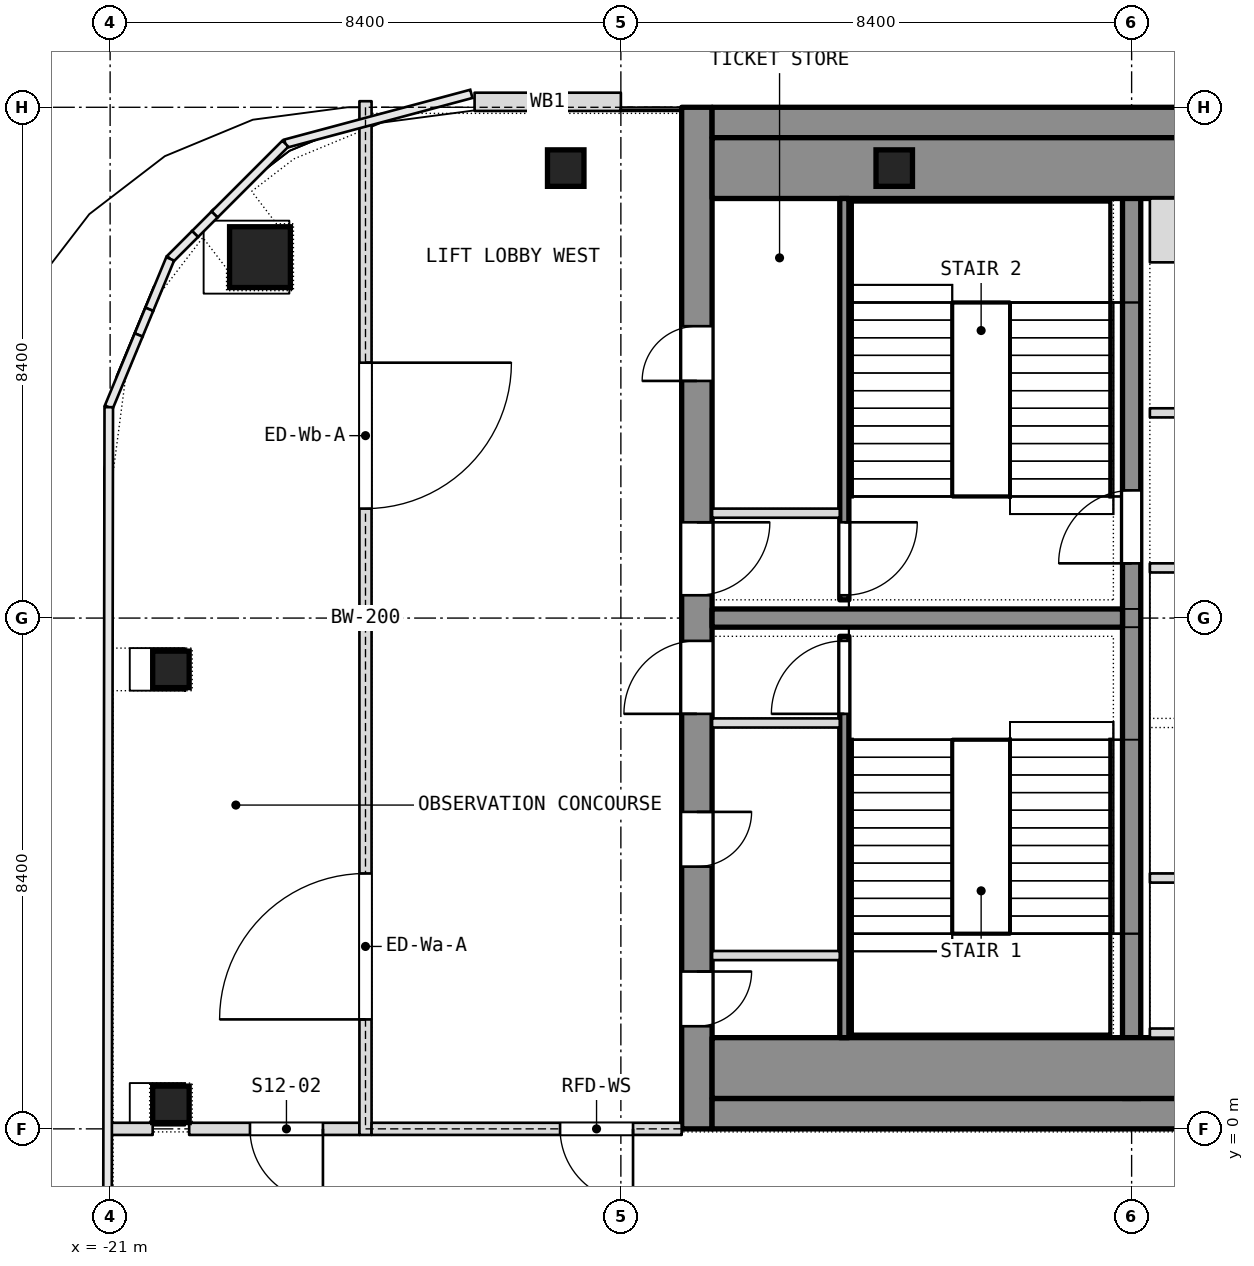
"""IFC4 building model, lengths in metres.
Left out: names, types, materials, properties, quantities, classifications, styles, units other than length and angle.
Written with IfcOpenShell. Run it as: python <this file> out.ifc"""

import sys

from ifc_helpers import new_model, si_unit, direction, frame, frame_2d, origin, origin_2d, place, context, subcontext, project, spatial, rectangle, extrude, element, fill, save


model = new_model("IFC4")
c1 = context("Model", 3, precision=1e-05, world=origin(), true_north=direction((0.0, 1.0)))
c2 = subcontext(c1, "Body", "Model", "MODEL_VIEW")
j1 = project(units=[si_unit("LENGTHUNIT", "METRE"), si_unit("PLANEANGLEUNIT", "RADIAN")], contexts=[c1])
p1 = place(None, origin())
s1 = spatial("IfcSite", under=j1, at=p1, CompositionType="ELEMENT")
p2 = place(p1, origin())
s2 = spatial("IfcBuilding", under=s1, at=p2, CompositionType="ELEMENT")
p3 = place(p2, frame((0.0, 0.0, 281.3)))
s3 = spatial("IfcBuildingStorey", under=s2, at=p3, CompositionType="ELEMENT", Elevation=281.3)
p4 = place(p3, frame((-11.35, 0.0, 0.0), z_axis=(0.0, 0.0, 1.0), x_axis=(0.0, 1.0, 0.0)))
e1 = element("IfcWall", 1, at=p4, inside=s3, PredefinedType="SHEAR", context=c2, shape_type="SweptSolid", body=[
    extrude(rectangle(XDim=16.8, YDim=0.5, at=frame_2d((8.4, 0.0))), origin(), (0.0, 0.0, 1.0), 7.2),
])
p5 = place(p4, frame((1.688, 0.0, 0.0)))
e2 = element("IfcOpeningElement", 2, at=p5, cuts=e1, PredefinedType="OPENING", context=c2, shape_type="SweptSolid", body=[
    extrude(rectangle(XDim=0.9, YDim=2.1, at=frame_2d((0.45, 1.05))), frame((0.0, 0.25, 0.0), z_axis=(0.0, -1.0, 0.0), x_axis=(1.0, 0.0, 0.0)), (0.0, 0.0, 1.0), 0.5),
])
p6 = place(p4, frame((4.312, 0.0, 0.0)))
e3 = element("IfcOpeningElement", 3, at=p6, cuts=e1, PredefinedType="OPENING", context=c2, shape_type="SweptSolid", body=[
    extrude(rectangle(XDim=0.9, YDim=2.1, at=frame_2d((0.45, 1.05))), frame((0.0, 0.25, 0.0), z_axis=(0.0, -1.0, 0.0), x_axis=(1.0, 0.0, 0.0)), (0.0, 0.0, 1.0), 0.5),
])
p7 = place(p4, frame((6.825, 0.0, 0.0)))
e4 = element("IfcOpeningElement", 4, at=p7, cuts=e1, PredefinedType="OPENING", context=c2, shape_type="SweptSolid", body=[
    extrude(rectangle(XDim=1.2, YDim=2.1, at=frame_2d((0.6, 1.05))), frame((0.0, 0.25, 0.0), z_axis=(0.0, -1.0, 0.0), x_axis=(1.0, 0.0, 0.0)), (0.0, 0.0, 1.0), 0.5),
])
p8 = place(p4, frame((12.3, 0.0, 0.0)))
e5 = element("IfcOpeningElement", 5, at=p8, cuts=e1, PredefinedType="OPENING", context=c2, shape_type="SweptSolid", body=[
    extrude(rectangle(XDim=0.9, YDim=2.1, at=frame_2d((0.45, 1.05))), frame((0.0, 0.25, 0.0), z_axis=(0.0, -1.0, 0.0), x_axis=(1.0, 0.0, 0.0)), (0.0, 0.0, 1.0), 0.5),
])
p9 = place(p4, frame((8.775, 0.0, 0.0)))
e6 = element("IfcOpeningElement", 6, at=p9, cuts=e1, PredefinedType="OPENING", context=c2, shape_type="SweptSolid", body=[
    extrude(rectangle(XDim=1.2, YDim=2.1, at=frame_2d((0.6, 1.05))), frame((0.0, 0.25, 0.0), z_axis=(0.0, -1.0, 0.0), x_axis=(1.0, 0.0, 0.0)), (0.0, 0.0, 1.0), 0.5),
])
p10 = place(p3, frame((-11.1, 0.25, 0.0), z_axis=(0.0, 0.0, 1.0), x_axis=(1.0, 0.0, 0.0)))
e7 = element("IfcWall", 7, at=p10, inside=s3, PredefinedType="SHEAR", context=c2, shape_type="SweptSolid", body=[
    extrude(rectangle(XDim=22.2, YDim=0.5, at=frame_2d((11.1, 0.0))), origin(), (0.0, 0.0, 1.0), 7.2),
])
p11 = place(p10, frame((10.85, 0.0, 0.0)))
e8 = element("IfcOpeningElement", 8, at=p11, cuts=e7, PredefinedType="OPENING", context=c2, shape_type="SweptSolid", body=[
    extrude(rectangle(XDim=1.4, YDim=2.1, at=frame_2d((0.7, 1.05))), frame((0.0, 0.25, 0.0), z_axis=(0.0, -1.0, 0.0), x_axis=(1.0, 0.0, 0.0)), (0.0, 0.0, 1.0), 0.5),
])
p12 = place(p3, frame((-11.1, 16.55, 0.0), z_axis=(0.0, 0.0, 1.0), x_axis=(1.0, 0.0, 0.0)))
e9 = element("IfcWall", 9, at=p12, inside=s3, PredefinedType="SHEAR", context=c2, shape_type="SweptSolid", body=[
    extrude(rectangle(XDim=22.2, YDim=0.5, at=frame_2d((11.1, 0.0))), origin(), (0.0, 0.0, 1.0), 7.2),
])
p13 = place(p3, frame((-4.2, 0.5, 0.0), z_axis=(0.0, 0.0, 1.0), x_axis=(0.0, 1.0, 0.0)))
e10 = element("IfcWall", 10, at=p13, inside=s3, PredefinedType="SHEAR", context=c2, shape_type="SweptSolid", body=[
    extrude(rectangle(XDim=15.8, YDim=0.3, at=frame_2d((7.9, 0.0))), origin(), (0.0, 0.0, 1.0), 7.2),
])
p14 = place(p13, frame((8.8, 0.0, 0.0)))
e11 = element("IfcOpeningElement", 11, at=p14, cuts=e10, PredefinedType="OPENING", context=c2, shape_type="SweptSolid", body=[
    extrude(rectangle(XDim=1.2, YDim=2.1, at=frame_2d((0.6, 1.05))), frame((0.0, 0.15, 0.0), z_axis=(0.0, -1.0, 0.0), x_axis=(1.0, 0.0, 0.0)), (0.0, 0.0, 1.0), 0.3),
])
p15 = place(p3, frame((-11.1, 8.4, 0.0), z_axis=(0.0, 0.0, 1.0), x_axis=(1.0, 0.0, 0.0)))
e12 = element("IfcWall", 12, at=p15, inside=s3, PredefinedType="SHEAR", context=c2, shape_type="SweptSolid", body=[
    extrude(rectangle(XDim=6.75, YDim=0.3, at=frame_2d((3.375, 0.0))), origin(), (0.0, 0.0, 1.0), 7.2),
])
p16 = place(p3, frame((-18.535, 14.335, 0.0), z_axis=(0.0, 0.0, 1.0), x_axis=(1.0, 0.0, 0.0)))
e13 = element("IfcColumn", 13, at=p16, inside=s3, PredefinedType="COLUMN", context=c2, shape_type="SweptSolid", body=[
    extrude(rectangle(XDim=1.0, YDim=1.0, at=origin_2d()), origin(), (0.0, 0.0, 1.0), 7.2),
])
for number, where, z_axis, x_axis in (
    (14, (-20.0, 0.403, 0.0), (0.0, 0.0, 1.0), (1.0, 0.0, 0.0)),
    (15, (-20.0, 7.556, 0.0), (0.0, 0.0, 1.0), (1.0, 0.0, 0.0)),
    (16, (-13.507, 15.8, 0.0), (0.0, 0.0, 1.0), (1.0, 0.0, 0.0)),
    (17, (-8.104, 15.8, 0.0), (0.0, 0.0, 1.0), (1.0, 0.0, 0.0)),
):
    element("IfcColumn", number, at=place(p3, frame(where, z_axis=z_axis, x_axis=x_axis)), inside=s3, PredefinedType="COLUMN", context=c2, shape_type="SweptSolid", body=[
        extrude(rectangle(XDim=0.6, YDim=0.6, at=origin_2d()), origin(), (0.0, 0.0, 1.0), 7.2),
    ])
p17 = place(p3, frame((-21.0, 0.0, 0.0), z_axis=(0.0, 0.0, 1.0), x_axis=(1.0, 0.0, 0.0)))
e18 = element("IfcWall", 18, at=p17, inside=s3, PredefinedType="PARTITIONING", context=c2, shape_type="SweptSolid", body=[
    extrude(rectangle(XDim=0.7, YDim=0.2, at=frame_2d((0.35, 0.0))), origin(), (0.0, 0.0, 1.0), 6.94),
])
p18 = place(p3, frame((-19.7, 0.0, 0.0), z_axis=(0.0, 0.0, 1.0), x_axis=(1.0, 0.0, 0.0)))
e19 = element("IfcWall", 19, at=p18, inside=s3, PredefinedType="PARTITIONING", context=c2, shape_type="SweptSolid", body=[
    extrude(rectangle(XDim=2.8, YDim=0.2, at=frame_2d((1.4, 0.0))), origin(), (0.0, 0.0, 1.0), 6.6),
])
p19 = place(p18, frame((1.0, 0.0, 0.0)))
e20 = element("IfcOpeningElement", 20, at=p19, cuts=e19, PredefinedType="OPENING", context=c2, shape_type="SweptSolid", body=[
    extrude(rectangle(XDim=1.2, YDim=2.1, at=frame_2d((0.6, 1.05))), frame((0.0, 0.1, 0.0), z_axis=(0.0, -1.0, 0.0), x_axis=(1.0, 0.0, 0.0)), (0.0, 0.0, 1.0), 0.2),
])
p20 = place(p3, frame((-12.6, 16.89, 0.0), z_axis=(0.0, 0.0, 1.0), x_axis=(-1.0, 0.0, 0.0)))
e21 = element("IfcWall", 21, at=p20, inside=s3, PredefinedType="NOTDEFINED", context=c2, shape_type="SweptSolid", body=[
    extrude(rectangle(XDim=2.406, YDim=0.3, at=frame_2d((1.203, 0.0))), origin(), (0.0, 0.0, 1.0), 7.2),
])
p21 = place(p3, frame((-11.1, 1.0, 0.0), z_axis=(0.0, 0.0, 1.0), x_axis=(1.0, 0.0, 0.0)))
e22 = element("IfcWall", 22, at=p21, inside=s3, PredefinedType="PARTITIONING", context=c2, shape_type="SweptSolid", body=[
    extrude(rectangle(XDim=10.85, YDim=1.0, at=frame_2d((5.425, 0.0))), origin(), (0.0, 0.0, 1.0), 6.94),
])
p22 = place(p3, frame((-11.1, 15.8, 0.0), z_axis=(0.0, 0.0, 1.0), x_axis=(1.0, 0.0, 0.0)))
e23 = element("IfcWall", 23, at=p22, inside=s3, PredefinedType="PARTITIONING", context=c2, shape_type="SweptSolid", body=[
    extrude(rectangle(XDim=22.2, YDim=1.0, at=frame_2d((11.1, 0.0))), origin(), (0.0, 0.0, 1.0), 6.94),
])
p23 = place(p3, frame((-8.925, 1.5, 0.0), z_axis=(0.0, 0.0, 1.0), x_axis=(0.0, 1.0, 0.0)))
e24 = element("IfcWall", 24, at=p23, inside=s3, PredefinedType="SHEAR", context=c2, shape_type="SweptSolid", body=[
    extrude(rectangle(XDim=6.6, YDim=0.15, at=frame_2d((3.3, 0.0))), origin(), (0.0, 0.0, 1.0), 6.94),
])
p24 = place(p23, frame((5.325, 0.0, 0.0)))
e25 = element("IfcOpeningElement", 25, at=p24, cuts=e24, PredefinedType="OPENING", context=c2, shape_type="SweptSolid", body=[
    extrude(rectangle(XDim=1.2, YDim=2.1, at=frame_2d((0.6, 1.05))), frame((0.0, 0.075, 0.0), z_axis=(0.0, -1.0, 0.0), x_axis=(1.0, 0.0, 0.0)), (0.0, 0.0, 1.0), 0.15),
])
for number, where, z_axis, x_axis in (
    (26, (-11.1, 6.675, 0.0), (0.0, 0.0, 1.0), (1.0, 0.0, 0.0)),
    (27, (-11.1, 2.85, 0.0), (0.0, 0.0, 1.0), (1.0, 0.0, 0.0)),
):
    element("IfcWall", number, at=place(p3, frame(where, z_axis=z_axis, x_axis=x_axis)), inside=s3, PredefinedType="PARTITIONING", context=c2, shape_type="SweptSolid", body=[
        extrude(rectangle(XDim=2.1, YDim=0.15, at=frame_2d((1.05, 0.0))), origin(), (0.0, 0.0, 1.0), 6.94),
    ])
p25 = place(p3, frame((-8.925, 8.7, 0.0), z_axis=(0.0, 0.0, 1.0), x_axis=(0.0, 1.0, 0.0)))
e28 = element("IfcWall", 28, at=p25, inside=s3, PredefinedType="SHEAR", context=c2, shape_type="SweptSolid", body=[
    extrude(rectangle(XDim=6.6, YDim=0.15, at=frame_2d((3.3, 0.0))), origin(), (0.0, 0.0, 1.0), 6.94),
])
p26 = place(p25, frame((0.075, 0.0, 0.0)))
e29 = element("IfcOpeningElement", 29, at=p26, cuts=e28, PredefinedType="OPENING", context=c2, shape_type="SweptSolid", body=[
    extrude(rectangle(XDim=1.2, YDim=2.1, at=frame_2d((0.6, 1.05))), frame((0.0, 0.075, 0.0), z_axis=(0.0, -1.0, 0.0), x_axis=(1.0, 0.0, 0.0)), (0.0, 0.0, 1.0), 0.15),
])
p27 = place(p3, frame((-11.1, 10.125, 0.0), z_axis=(0.0, 0.0, 1.0), x_axis=(1.0, 0.0, 0.0)))
e30 = element("IfcWall", 30, at=p27, inside=s3, PredefinedType="PARTITIONING", context=c2, shape_type="SweptSolid", body=[
    extrude(rectangle(XDim=2.1, YDim=0.15, at=frame_2d((1.05, 0.0))), origin(), (0.0, 0.0, 1.0), 6.94),
])
p28 = place(p3, frame((-3.9, 4.125, 0.0), z_axis=(0.0, 0.0, 1.0), x_axis=(1.0, 0.0, 0.0)))
e31 = element("IfcWall", 31, at=p28, inside=s3, PredefinedType="PARTITIONING", context=c2, shape_type="SweptSolid", body=[
    extrude(rectangle(XDim=7.8, YDim=0.15, at=frame_2d((3.9, 0.0))), origin(), (0.0, 0.0, 1.0), 6.94),
])
p29 = place(p28, frame((3.75, 0.0, 0.0)))
e32 = element("IfcOpeningElement", 32, at=p29, cuts=e31, PredefinedType="OPENING", context=c2, shape_type="SweptSolid", body=[
    extrude(rectangle(XDim=1.2, YDim=2.1, at=frame_2d((0.6, 1.05))), frame((0.0, 0.075, 0.0), z_axis=(0.0, -1.0, 0.0), x_axis=(1.0, 0.0, 0.0)), (0.0, 0.0, 1.0), 0.15),
])
p30 = place(p3, frame((-3.9, 11.775, 0.0), z_axis=(0.0, 0.0, 1.0), x_axis=(1.0, 0.0, 0.0)))
e33 = element("IfcWall", 33, at=p30, inside=s3, PredefinedType="PARTITIONING", context=c2, shape_type="SweptSolid", body=[
    extrude(rectangle(XDim=7.8, YDim=0.15, at=frame_2d((3.9, 0.0))), origin(), (0.0, 0.0, 1.0), 6.94),
])
p31 = place(p30, frame((3.3, 0.0, 0.0)))
e34 = element("IfcOpeningElement", 34, at=p31, cuts=e33, PredefinedType="OPENING", context=c2, shape_type="SweptSolid", body=[
    extrude(rectangle(XDim=1.2, YDim=2.1, at=frame_2d((0.6, 1.05))), frame((0.0, 0.075, 0.0), z_axis=(0.0, -1.0, 0.0), x_axis=(1.0, 0.0, 0.0)), (0.0, 0.0, 1.0), 0.15),
])
p32 = place(p3, frame((-3.9, 1.575, 0.0), z_axis=(0.0, 0.0, 1.0), x_axis=(1.0, 0.0, 0.0)))
e35 = element("IfcWall", 35, at=p32, inside=s3, PredefinedType="SHEAR", context=c2, shape_type="SweptSolid", body=[
    extrude(rectangle(XDim=3.0, YDim=0.15, at=frame_2d((1.5, 0.0))), origin(), (0.0, 0.0, 1.0), 7.2),
])
p33 = place(p3, frame((-3.9, 9.225, 0.0), z_axis=(0.0, 0.0, 1.0), x_axis=(1.0, 0.0, 0.0)))
e36 = element("IfcWall", 36, at=p33, inside=s3, PredefinedType="SHEAR", context=c2, shape_type="SweptSolid", body=[
    extrude(rectangle(XDim=2.25, YDim=0.15, at=frame_2d((1.125, 0.0))), origin(), (0.0, 0.0, 1.0), 7.2),
])
p34 = place(p3, frame((-3.9, 14.775, 0.0), z_axis=(0.0, 0.0, 1.0), x_axis=(1.0, 0.0, 0.0)))
e37 = element("IfcWall", 37, at=p34, inside=s3, PredefinedType="PARTITIONING", context=c2, shape_type="SweptSolid", body=[
    extrude(rectangle(XDim=2.25, YDim=1.05, at=frame_2d((1.125, 0.0))), origin(), (0.0, 0.0, 1.0), 6.94),
])
p35 = place(p3, frame((-16.8, -0.1, 0.0), z_axis=(0.0, 0.0, 1.0), x_axis=(0.0, 1.0, 0.0)))
e38 = element("IfcWall", 38, at=p35, inside=s3, PredefinedType="PARTITIONING", context=c2, shape_type="SweptSolid", body=[
    extrude(rectangle(XDim=17.0, YDim=0.2, at=frame_2d((8.5, 0.0))), origin(), (0.0, 0.0, 1.0), 6.94),
])
p36 = place(p35, frame((1.9, 0.0, 0.0)))
e39 = element("IfcOpeningElement", 39, at=p36, cuts=e38, PredefinedType="OPENING", context=c2, shape_type="SweptSolid", body=[
    extrude(rectangle(XDim=2.4, YDim=2.1, at=frame_2d((1.2, 1.05))), frame((0.0, 0.1, 0.0), z_axis=(0.0, -1.0, 0.0), x_axis=(1.0, 0.0, 0.0)), (0.0, 0.0, 1.0), 0.2),
])
p37 = place(p35, frame((10.3, 0.0, 0.0)))
e40 = element("IfcOpeningElement", 40, at=p37, cuts=e38, PredefinedType="OPENING", context=c2, shape_type="SweptSolid", body=[
    extrude(rectangle(XDim=2.4, YDim=2.1, at=frame_2d((1.2, 1.05))), frame((0.0, 0.1, 0.0), z_axis=(0.0, -1.0, 0.0), x_axis=(1.0, 0.0, 0.0)), (0.0, 0.0, 1.0), 0.2),
])
p38 = place(p3, frame((-16.7, 0.0, 0.0), z_axis=(0.0, 0.0, 1.0), x_axis=(1.0, 0.0, 0.0)))
e41 = element("IfcWall", 41, at=p38, inside=s3, PredefinedType="PARTITIONING", context=c2, shape_type="SweptSolid", body=[
    extrude(rectangle(XDim=5.1, YDim=0.2, at=frame_2d((2.55, 0.0))), origin(), (0.0, 0.0, 1.0), 6.6),
])
p39 = place(p38, frame((3.1, 0.0, 0.0)))
e42 = element("IfcOpeningElement", 42, at=p39, cuts=e41, PredefinedType="OPENING", context=c2, shape_type="SweptSolid", body=[
    extrude(rectangle(XDim=1.2, YDim=2.1, at=frame_2d((0.6, 1.05))), frame((0.0, 0.1, 0.0), z_axis=(0.0, -1.0, 0.0), x_axis=(1.0, 0.0, 0.0)), (0.0, 0.0, 1.0), 0.2),
])
p40 = place(p19, origin())
e43 = element("IfcDoor", 43, at=p40, inside=s3, OperationType="SINGLE_SWING_LEFT", PredefinedType="DOOR", context=c2, shape_type="SweptSolid", body=[
    extrude(rectangle(XDim=1.2, YDim=2.1, at=frame_2d((0.6, 1.05))), frame((0.0, 0.025, 0.0), z_axis=(0.0, -1.0, 0.0), x_axis=(1.0, 0.0, 0.0)), (0.0, 0.0, 1.0), 0.05),
])
fill(e20, e43)
p41 = place(p5, origin())
e44 = element("IfcDoor", 44, at=p41, inside=s3, OperationType="SINGLE_SWING_LEFT", PredefinedType="DOOR", context=c2, shape_type="SweptSolid", body=[
    extrude(rectangle(XDim=0.9, YDim=2.1, at=frame_2d((0.45, 1.05))), frame((0.0, 0.025, 0.0), z_axis=(0.0, -1.0, 0.0), x_axis=(1.0, 0.0, 0.0)), (0.0, 0.0, 1.0), 0.05),
])
fill(e2, e44)
p42 = place(p6, origin())
e45 = element("IfcDoor", 45, at=p42, inside=s3, OperationType="SINGLE_SWING_LEFT", PredefinedType="DOOR", context=c2, shape_type="SweptSolid", body=[
    extrude(rectangle(XDim=0.9, YDim=2.1, at=frame_2d((0.45, 1.05))), frame((0.0, 0.025, 0.0), z_axis=(0.0, -1.0, 0.0), x_axis=(1.0, 0.0, 0.0)), (0.0, 0.0, 1.0), 0.05),
])
fill(e3, e45)
p43 = place(p7, origin())
e46 = element("IfcDoor", 46, at=p43, inside=s3, OperationType="SINGLE_SWING_LEFT", PredefinedType="DOOR", context=c2, shape_type="SweptSolid", body=[
    extrude(rectangle(XDim=1.2, YDim=2.1, at=frame_2d((0.6, 1.05))), frame((0.0, 0.025, 0.0), z_axis=(0.0, -1.0, 0.0), x_axis=(1.0, 0.0, 0.0)), (0.0, 0.0, 1.0), 0.05),
])
fill(e4, e46)
p44 = place(p24, origin())
e47 = element("IfcDoor", 47, at=p44, inside=s3, OperationType="SINGLE_SWING_LEFT", PredefinedType="DOOR", context=c2, shape_type="SweptSolid", body=[
    extrude(rectangle(XDim=1.2, YDim=2.1, at=frame_2d((0.6, 1.05))), frame((0.0, 0.025, 0.0), z_axis=(0.0, -1.0, 0.0), x_axis=(1.0, 0.0, 0.0)), (0.0, 0.0, 1.0), 0.05),
])
fill(e25, e47)
p45 = place(p8, origin())
e48 = element("IfcDoor", 48, at=p45, inside=s3, OperationType="SINGLE_SWING_LEFT", PredefinedType="DOOR", context=c2, shape_type="SweptSolid", body=[
    extrude(rectangle(XDim=0.9, YDim=2.1, at=frame_2d((0.45, 1.05))), frame((0.0, 0.025, 0.0), z_axis=(0.0, -1.0, 0.0), x_axis=(1.0, 0.0, 0.0)), (0.0, 0.0, 1.0), 0.05),
])
fill(e5, e48)
p46 = place(p9, origin())
e49 = element("IfcDoor", 49, at=p46, inside=s3, OperationType="SINGLE_SWING_LEFT", PredefinedType="DOOR", context=c2, shape_type="SweptSolid", body=[
    extrude(rectangle(XDim=1.2, YDim=2.1, at=frame_2d((0.6, 1.05))), frame((0.0, 0.025, 0.0), z_axis=(0.0, -1.0, 0.0), x_axis=(1.0, 0.0, 0.0)), (0.0, 0.0, 1.0), 0.05),
])
fill(e6, e49)
p47 = place(p26, origin())
e50 = element("IfcDoor", 50, at=p47, inside=s3, OperationType="SINGLE_SWING_LEFT", PredefinedType="DOOR", context=c2, shape_type="SweptSolid", body=[
    extrude(rectangle(XDim=1.2, YDim=2.1, at=frame_2d((0.6, 1.05))), frame((0.0, 0.025, 0.0), z_axis=(0.0, -1.0, 0.0), x_axis=(1.0, 0.0, 0.0)), (0.0, 0.0, 1.0), 0.05),
])
fill(e29, e50)
p48 = place(p14, origin())
e51 = element("IfcDoor", 51, at=p48, inside=s3, OperationType="SINGLE_SWING_LEFT", PredefinedType="DOOR", context=c2, shape_type="SweptSolid", body=[
    extrude(rectangle(XDim=1.2, YDim=2.1, at=frame_2d((0.6, 1.05))), frame((0.0, 0.025, 0.0), z_axis=(0.0, -1.0, 0.0), x_axis=(1.0, 0.0, 0.0)), (0.0, 0.0, 1.0), 0.05),
])
fill(e11, e51)
p49 = place(p36, origin())
e52 = element("IfcDoor", 52, at=p49, inside=s3, OperationType="DOUBLE_DOOR_SINGLE_SWING", PredefinedType="DOOR", context=c2, shape_type="SweptSolid", body=[
    extrude(rectangle(XDim=2.4, YDim=2.1, at=frame_2d((1.2, 1.05))), frame((0.0, 0.025, 0.0), z_axis=(0.0, -1.0, 0.0), x_axis=(1.0, 0.0, 0.0)), (0.0, 0.0, 1.0), 0.05),
])
fill(e39, e52)
p50 = place(p37, origin())
e53 = element("IfcDoor", 53, at=p50, inside=s3, OperationType="DOUBLE_DOOR_SINGLE_SWING", PredefinedType="DOOR", context=c2, shape_type="SweptSolid", body=[
    extrude(rectangle(XDim=2.4, YDim=2.1, at=frame_2d((1.2, 1.05))), frame((0.0, 0.025, 0.0), z_axis=(0.0, -1.0, 0.0), x_axis=(1.0, 0.0, 0.0)), (0.0, 0.0, 1.0), 0.05),
])
fill(e40, e53)
p51 = place(p39, origin())
e54 = element("IfcDoor", 54, at=p51, inside=s3, OperationType="SINGLE_SWING_LEFT", PredefinedType="DOOR", context=c2, shape_type="SweptSolid", body=[
    extrude(rectangle(XDim=1.2, YDim=2.1, at=frame_2d((0.6, 1.05))), frame((0.0, 0.025, 0.0), z_axis=(0.0, -1.0, 0.0), x_axis=(1.0, 0.0, 0.0)), (0.0, 0.0, 1.0), 0.05),
])
fill(e42, e54)
save(model, sys.argv[1])
